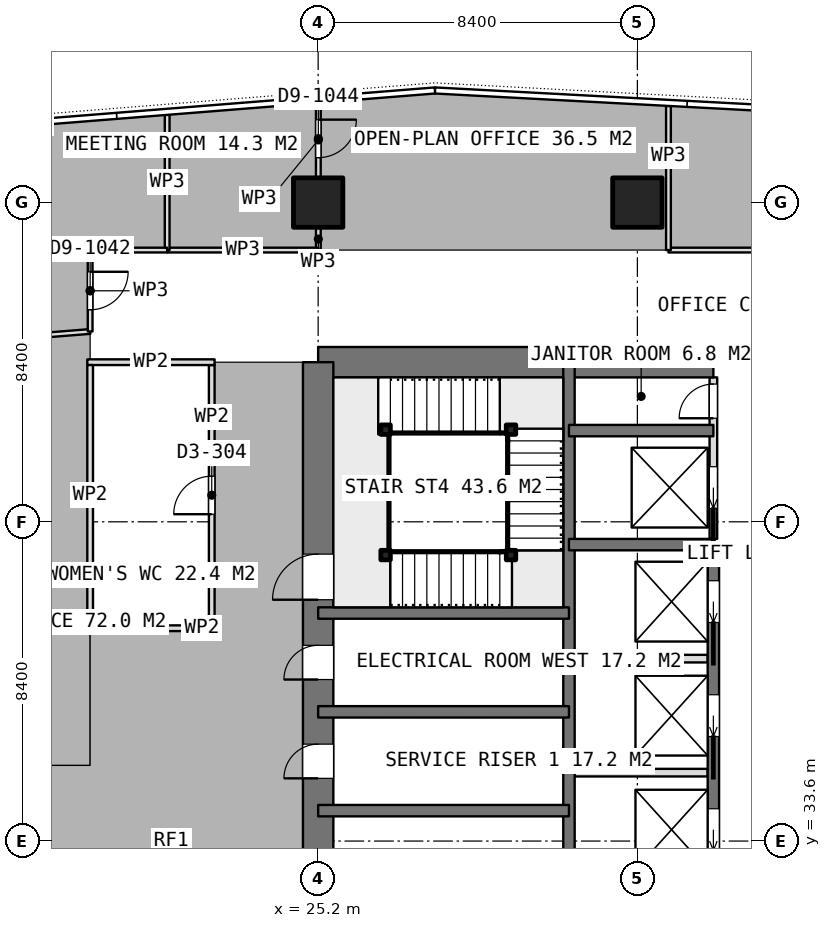
"""IFC4 building model, lengths in metres.
Left out: names, types, materials, properties, quantities, classifications, styles, units other than length and angle.
Written with IfcOpenShell. Run it as: python <this file> out.ifc"""

import sys

from ifc_helpers import new_model, si_unit, direction, frame, frame_2d, origin, origin_2d, place, context, subcontext, project, spatial, rectangle, extrude, element, fill, save


model = new_model("IFC4")
c1 = context("Model", 3, precision=1e-05, world=origin(), true_north=direction((0.0, 1.0)))
c2 = subcontext(c1, "Body", "Model", "MODEL_VIEW")
j1 = project(units=[si_unit("LENGTHUNIT", "METRE"), si_unit("PLANEANGLEUNIT", "RADIAN")], contexts=[c1])
p1 = place(None, origin())
s1 = spatial("IfcSite", under=j1, at=p1, CompositionType="ELEMENT")
p2 = place(p1, origin())
s2 = spatial("IfcBuilding", under=s1, at=p2, CompositionType="ELEMENT")
p3 = place(p2, frame((0.0, 0.0, 280.1)))
s3 = spatial("IfcBuildingStorey", under=s2, at=p3, CompositionType="ELEMENT", Elevation=280.1)
p4 = place(p3, frame((25.2, 46.2, 0.0), z_axis=(0.0, 0.0, 1.0), x_axis=(1.0, 0.0, 0.0)))
e1 = element("IfcWall", 1, at=p4, inside=s3, PredefinedType="SHEAR", context=c2, shape_type="SweptSolid", body=[
    extrude(rectangle(XDim=10.4, YDim=0.8, at=frame_2d((5.2, 0.0))), origin(), (0.0, 0.0, 1.0), 3.75),
])
p5 = place(p3, frame((25.2, 21.0, 0.0), z_axis=(0.0, 0.0, 1.0), x_axis=(0.0, 1.0, 0.0)))
e2 = element("IfcWall", 2, at=p5, inside=s3, PredefinedType="SHEAR", context=c2, shape_type="SweptSolid", body=[
    extrude(rectangle(XDim=25.2, YDim=0.8, at=frame_2d((12.6, 0.0))), origin(), (0.0, 0.0, 1.0), 3.75),
])
p6 = place(p5, frame((7.8, 0.0, 0.0)))
e3 = element("IfcOpeningElement", 3, at=p6, cuts=e2, PredefinedType="OPENING", context=c2, shape_type="SweptSolid", body=[
    extrude(rectangle(XDim=1.2, YDim=2.1, at=frame_2d((0.6, 1.05))), frame((0.0, 0.41, 0.0), z_axis=(0.0, -1.0, 0.0), x_axis=(1.0, 0.0, 0.0)), (0.0, 0.0, 1.0), 0.82),
])
p7 = place(p5, frame((14.25, 0.0, 0.0)))
e4 = element("IfcOpeningElement", 4, at=p7, cuts=e2, PredefinedType="OPENING", context=c2, shape_type="SweptSolid", body=[
    extrude(rectangle(XDim=0.9, YDim=2.1, at=frame_2d((0.45, 1.05))), frame((0.0, 0.41, 0.0), z_axis=(0.0, -1.0, 0.0), x_axis=(1.0, 0.0, 0.0)), (0.0, 0.0, 1.0), 0.82),
])
p8 = place(p5, frame((16.85, 0.0, 0.0)))
e5 = element("IfcOpeningElement", 5, at=p8, cuts=e2, PredefinedType="OPENING", context=c2, shape_type="SweptSolid", body=[
    extrude(rectangle(XDim=0.9, YDim=2.1, at=frame_2d((0.45, 1.05))), frame((0.0, 0.41, 0.0), z_axis=(0.0, -1.0, 0.0), x_axis=(1.0, 0.0, 0.0)), (0.0, 0.0, 1.0), 0.82),
])
p9 = place(p5, frame((18.95, 0.0, 0.0)))
e6 = element("IfcOpeningElement", 6, at=p9, cuts=e2, PredefinedType="OPENING", context=c2, shape_type="SweptSolid", body=[
    extrude(rectangle(XDim=1.2, YDim=2.1, at=frame_2d((0.6, 1.05))), frame((0.0, 0.41, 0.0), z_axis=(0.0, -1.0, 0.0), x_axis=(1.0, 0.0, 0.0)), (0.0, 0.0, 1.0), 0.82),
])
p10 = place(p3, frame((31.8, 21.0, 0.0), z_axis=(0.0, 0.0, 1.0), x_axis=(0.0, 1.0, 0.0)))
e7 = element("IfcWall", 7, at=p10, inside=s3, PredefinedType="SHEAR", context=c2, shape_type="SweptSolid", body=[
    extrude(rectangle(XDim=25.2, YDim=0.3, at=frame_2d((12.6, 0.0))), origin(), (0.0, 0.0, 1.0), 3.75),
])
p11 = place(p3, frame((35.6, 23.4, 0.0), z_axis=(0.0, 0.0, 1.0), x_axis=(0.0, 1.0, 0.0)))
e8 = element("IfcWall", 8, at=p11, inside=s3, PredefinedType="SHEAR", context=c2, shape_type="SweptSolid", body=[
    extrude(rectangle(XDim=18.0, YDim=0.3, at=frame_2d((9.0, 0.0))), origin(), (0.0, 0.0, 1.0), 3.75),
])
p12 = place(p11, frame((0.95, 0.0, 0.0)))
e9 = element("IfcOpeningElement", 9, at=p12, cuts=e8, PredefinedType="OPENING", context=c2, shape_type="SweptSolid", body=[
    extrude(rectangle(XDim=1.1, YDim=2.1, at=frame_2d((0.55, 1.05))), frame((0.0, 0.16, 0.0), z_axis=(0.0, -1.0, 0.0), x_axis=(1.0, 0.0, 0.0)), (0.0, 0.0, 1.0), 0.32),
])
p13 = place(p11, frame((3.95, 0.0, 0.0)))
e10 = element("IfcOpeningElement", 10, at=p13, cuts=e8, PredefinedType="OPENING", context=c2, shape_type="SweptSolid", body=[
    extrude(rectangle(XDim=1.1, YDim=2.1, at=frame_2d((0.55, 1.05))), frame((0.0, 0.16, 0.0), z_axis=(0.0, -1.0, 0.0), x_axis=(1.0, 0.0, 0.0)), (0.0, 0.0, 1.0), 0.32),
])
p14 = place(p11, frame((6.95, 0.0, 0.0)))
e11 = element("IfcOpeningElement", 11, at=p14, cuts=e8, PredefinedType="OPENING", context=c2, shape_type="SweptSolid", body=[
    extrude(rectangle(XDim=1.1, YDim=2.1, at=frame_2d((0.55, 1.05))), frame((0.0, 0.16, 0.0), z_axis=(0.0, -1.0, 0.0), x_axis=(1.0, 0.0, 0.0)), (0.0, 0.0, 1.0), 0.32),
])
p15 = place(p11, frame((9.95, 0.0, 0.0)))
e12 = element("IfcOpeningElement", 12, at=p15, cuts=e8, PredefinedType="OPENING", context=c2, shape_type="SweptSolid", body=[
    extrude(rectangle(XDim=1.1, YDim=2.1, at=frame_2d((0.55, 1.05))), frame((0.0, 0.16, 0.0), z_axis=(0.0, -1.0, 0.0), x_axis=(1.0, 0.0, 0.0)), (0.0, 0.0, 1.0), 0.32),
])
p16 = place(p11, frame((12.95, 0.0, 0.0)))
e13 = element("IfcOpeningElement", 13, at=p16, cuts=e8, PredefinedType="OPENING", context=c2, shape_type="SweptSolid", body=[
    extrude(rectangle(XDim=1.1, YDim=2.1, at=frame_2d((0.55, 1.05))), frame((0.0, 0.16, 0.0), z_axis=(0.0, -1.0, 0.0), x_axis=(1.0, 0.0, 0.0)), (0.0, 0.0, 1.0), 0.32),
])
p17 = place(p11, frame((15.95, 0.0, 0.0)))
e14 = element("IfcOpeningElement", 14, at=p17, cuts=e8, PredefinedType="OPENING", context=c2, shape_type="SweptSolid", body=[
    extrude(rectangle(XDim=1.1, YDim=2.1, at=frame_2d((0.55, 1.05))), frame((0.0, 0.16, 0.0), z_axis=(0.0, -1.0, 0.0), x_axis=(1.0, 0.0, 0.0)), (0.0, 0.0, 1.0), 0.32),
])
for number, where, z_axis, x_axis in (
    (15, (31.8, 41.4, 0.0), (0.0, 0.0, 1.0), (1.0, 0.0, 0.0)),
    (16, (31.8, 44.4, 0.0), (0.0, 0.0, 1.0), (1.0, 0.0, 0.0)),
):
    element("IfcWall", number, at=place(p3, frame(where, z_axis=z_axis, x_axis=x_axis)), inside=s3, PredefinedType="SHEAR", context=c2, shape_type="SweptSolid", body=[
        extrude(rectangle(XDim=3.8, YDim=0.3, at=frame_2d((1.9, 0.0))), origin(), (0.0, 0.0, 1.0), 3.75),
    ])
for number, where, z_axis, x_axis in (
    (17, (25.2, 34.4, 0.0), (0.0, 0.0, 1.0), (1.0, 0.0, 0.0)),
    (18, (25.2, 37.0, 0.0), (0.0, 0.0, 1.0), (1.0, 0.0, 0.0)),
    (19, (25.2, 39.6, 0.0), (0.0, 0.0, 1.0), (1.0, 0.0, 0.0)),
):
    element("IfcWall", number, at=place(p3, frame(where, z_axis=z_axis, x_axis=x_axis)), inside=s3, PredefinedType="SHEAR", context=c2, shape_type="SweptSolid", body=[
        extrude(rectangle(XDim=6.6, YDim=0.3, at=frame_2d((3.3, 0.0))), origin(), (0.0, 0.0, 1.0), 3.75),
    ])
for number, where, z_axis, x_axis in (
    (20, (25.2, 50.4, 0.0), (0.0, 0.0, 1.0), (1.0, 0.0, 0.0)),
    (21, (33.6, 50.4, 0.0), (0.0, 0.0, 1.0), (1.0, 0.0, 0.0)),
):
    element("IfcColumn", number, at=place(p3, frame(where, z_axis=z_axis, x_axis=x_axis)), inside=s3, PredefinedType="COLUMN", context=c2, shape_type="SweptSolid", body=[
        extrude(rectangle(XDim=1.3, YDim=1.3, at=origin_2d()), origin(), (0.0, 0.0, 1.0), 3.75),
    ])
for number, where, z_axis, x_axis in (
    (22, (31.95, 35.4, 0.0), (0.0, 0.0, 1.0), (1.0, 0.0, 0.0)),
    (23, (31.95, 38.4, 0.0), (0.0, 0.0, 1.0), (1.0, 0.0, 0.0)),
):
    element("IfcWall", number, at=place(p3, frame(where, z_axis=z_axis, x_axis=x_axis)), inside=s3, PredefinedType="PARTITIONING", context=c2, shape_type="SweptSolid", body=[
        extrude(rectangle(XDim=3.5, YDim=0.2, at=frame_2d((1.75, 0.0))), origin(), (0.0, 0.0, 1.0), 3.5),
    ])
p18 = place(p3, frame((35.6, 41.55, 0.0), z_axis=(0.0, 0.0, 1.0), x_axis=(0.0, 1.0, 0.0)))
e24 = element("IfcWall", 24, at=p18, inside=s3, PredefinedType="PARTITIONING", context=c2, shape_type="SweptSolid", body=[
    extrude(rectangle(XDim=4.25, YDim=0.2, at=frame_2d((2.125, 0.0))), origin(), (0.0, 0.0, 1.0), 3.5),
])
p19 = place(p18, frame((3.175, 0.0, 0.0)))
e25 = element("IfcOpeningElement", 25, at=p19, cuts=e24, PredefinedType="OPENING", context=c2, shape_type="SweptSolid", body=[
    extrude(rectangle(XDim=0.9, YDim=2.1, at=frame_2d((0.45, 1.05))), frame((0.0, 0.11, 0.0), z_axis=(0.0, -1.0, 0.0), x_axis=(1.0, 0.0, 0.0)), (0.0, 0.0, 1.0), 0.22),
])
p20 = place(p18, frame((0.8, 0.0, 0.0)))
e26 = element("IfcOpeningElement", 26, at=p20, cuts=e24, PredefinedType="OPENING", context=c2, shape_type="SweptSolid", body=[
    extrude(rectangle(XDim=1.1, YDim=2.1, at=frame_2d((0.55, 1.05))), frame((0.0, 0.11, 0.0), z_axis=(0.0, -1.0, 0.0), x_axis=(1.0, 0.0, 0.0)), (0.0, 0.0, 1.0), 0.22),
])
for number, where, z_axis, x_axis in (
    (27, (19.125, 39.2, 0.0), (0.0, 0.0, 1.0), (1.0, 0.0, 0.0)),
    (28, (19.125, 46.2, 0.0), (0.0, 0.0, 1.0), (1.0, 0.0, 0.0)),
):
    element("IfcWall", number, at=place(p3, frame(where, z_axis=z_axis, x_axis=x_axis)), inside=s3, PredefinedType="PARTITIONING", context=c2, shape_type="SweptSolid", body=[
        extrude(rectangle(XDim=3.35, YDim=0.15, at=frame_2d((1.675, 0.0))), origin(), (0.0, 0.0, 1.0), 3.5),
    ])
p21 = place(p3, frame((19.2, 39.275, 0.0), z_axis=(0.0, 0.0, 1.0), x_axis=(0.0, 1.0, 0.0)))
e29 = element("IfcWall", 29, at=p21, inside=s3, PredefinedType="PARTITIONING", context=c2, shape_type="SweptSolid", body=[
    extrude(rectangle(XDim=6.85, YDim=0.15, at=frame_2d((3.425, 0.0))), origin(), (0.0, 0.0, 1.0), 3.5),
])
p22 = place(p3, frame((22.4, 39.275, 0.0), z_axis=(0.0, 0.0, 1.0), x_axis=(0.0, 1.0, 0.0)))
e30 = element("IfcWall", 30, at=p22, inside=s3, PredefinedType="PARTITIONING", context=c2, shape_type="SweptSolid", body=[
    extrude(rectangle(XDim=6.85, YDim=0.15, at=frame_2d((3.425, 0.0))), origin(), (0.0, 0.0, 1.0), 3.5),
])
p23 = place(p22, frame((2.925, 0.0, 0.0)))
e31 = element("IfcOpeningElement", 31, at=p23, cuts=e30, PredefinedType="OPENING", context=c2, shape_type="SweptSolid", body=[
    extrude(rectangle(XDim=1.0, YDim=2.1, at=frame_2d((0.5, 1.05))), frame((0.0, 0.085, 0.0), z_axis=(0.0, -1.0, 0.0), x_axis=(1.0, 0.0, 0.0)), (0.0, 0.0, 1.0), 0.17),
])
p24 = place(p3, frame((52.123, 49.15, 0.0), z_axis=(0.0, 0.0, 1.0), x_axis=(-1.0, 0.0, 0.0)))
e32 = element("IfcWall", 32, at=p24, inside=s3, PredefinedType="PARTITIONING", context=c2, shape_type="SweptSolid", body=[
    extrude(rectangle(XDim=17.705, YDim=0.125, at=frame_2d((8.853, 0.0))), origin(), (0.0, 0.0, 1.0), 3.5),
])
p25 = place(p24, frame((7.553, 0.0, 0.0)))
e33 = element("IfcOpeningElement", 33, at=p25, cuts=e32, PredefinedType="OPENING", context=c2, shape_type="SweptSolid", body=[
    extrude(rectangle(XDim=1.8, YDim=2.1, at=frame_2d((0.9, 1.05))), frame((0.0, 0.073, 0.0), z_axis=(0.0, -1.0, 0.0), x_axis=(1.0, 0.0, 0.0)), (0.0, 0.0, 1.0), 0.145),
])
p26 = place(p3, frame((34.418, 49.15, 0.0), z_axis=(0.0, 0.0, 1.0), x_axis=(0.0, 1.0, 0.0)))
e34 = element("IfcWall", 34, at=p26, inside=s3, PredefinedType="PARTITIONING", context=c2, shape_type="SweptSolid", body=[
    extrude(rectangle(XDim=3.793, YDim=0.125, at=frame_2d((1.896, 0.0))), origin(), (0.0, 0.0, 1.0), 3.5),
])
p27 = place(p3, frame((25.205, 53.025, 0.0), z_axis=(0.0, 0.0, 1.0), x_axis=(0.0, -1.0, 0.0)))
e35 = element("IfcWall", 35, at=p27, inside=s3, PredefinedType="PARTITIONING", context=c2, shape_type="SweptSolid", body=[
    extrude(rectangle(XDim=1.955, YDim=0.125, at=frame_2d((0.978, 0.0))), origin(), (0.0, 0.0, 1.0), 3.5),
])
p28 = place(p27, frame((0.443, 0.0, 0.0)))
e36 = element("IfcOpeningElement", 36, at=p28, cuts=e35, PredefinedType="OPENING", context=c2, shape_type="SweptSolid", body=[
    extrude(rectangle(XDim=1.0, YDim=2.1, at=frame_2d((0.5, 1.05))), frame((0.0, 0.073, 0.0), z_axis=(0.0, -1.0, 0.0), x_axis=(1.0, 0.0, 0.0)), (0.0, 0.0, 1.0), 0.145),
])
p29 = place(p3, frame((25.205, 49.73, 0.0), z_axis=(0.0, 0.0, 1.0), x_axis=(0.0, -1.0, 0.0)))
e37 = element("IfcWall", 37, at=p29, inside=s3, PredefinedType="PARTITIONING", context=c2, shape_type="SweptSolid", body=[
    extrude(rectangle(XDim=0.58, YDim=0.125, at=frame_2d((0.29, 0.0))), origin(), (0.0, 0.0, 1.0), 3.5),
])
p30 = place(p3, frame((25.205, 49.15, 0.0), z_axis=(0.0, 0.0, 1.0), x_axis=(-1.0, 0.0, 0.0)))
e38 = element("IfcWall", 38, at=p30, inside=s3, PredefinedType="PARTITIONING", context=c2, shape_type="SweptSolid", body=[
    extrude(rectangle(XDim=3.978, YDim=0.125, at=frame_2d((1.989, 0.0))), origin(), (0.0, 0.0, 1.0), 3.5),
])
p31 = place(p3, frame((21.227, 49.15, 0.0), z_axis=(0.0, 0.0, 1.0), x_axis=(0.0, 1.0, 0.0)))
e39 = element("IfcWall", 39, at=p31, inside=s3, PredefinedType="PARTITIONING", context=c2, shape_type="SweptSolid", body=[
    extrude(rectangle(XDim=3.558, YDim=0.125, at=frame_2d((1.779, 0.0))), origin(), (0.0, 0.0, 1.0), 3.5),
])
p32 = place(p3, frame((19.2, 47.008, 0.0), z_axis=(0.0, 0.0, 1.0), x_axis=(-0.996842300725, -0.079406721921, 0.0)))
e40 = element("IfcWall", 40, at=p32, inside=s3, PredefinedType="PARTITIONING", context=c2, shape_type="SweptSolid", body=[
    extrude(rectangle(XDim=6.02, YDim=0.125, at=frame_2d((3.01, 0.0))), origin(), (0.0, 0.0, 1.0), 3.5),
])
p33 = place(p3, frame((21.226, 49.15, 0.0), z_axis=(0.0, 0.0, 1.0), x_axis=(-1.0, 0.0, 0.0)))
e41 = element("IfcWall", 41, at=p33, inside=s3, PredefinedType="PARTITIONING", context=c2, shape_type="SweptSolid", body=[
    extrude(rectangle(XDim=2.026, YDim=0.125, at=frame_2d((1.013, 0.0))), origin(), (0.0, 0.0, 1.0), 3.5),
])
p34 = place(p3, frame((19.2, 49.15, 0.0), z_axis=(0.0, 0.0, 1.0), x_axis=(0.0, -1.0, 0.0)))
e42 = element("IfcWall", 42, at=p34, inside=s3, PredefinedType="PARTITIONING", context=c2, shape_type="SweptSolid", body=[
    extrude(rectangle(XDim=2.142, YDim=0.125, at=frame_2d((1.071, 0.0))), origin(), (0.0, 0.0, 1.0), 3.5),
])
p35 = place(p34, frame((0.571, 0.0, 0.0)))
e43 = element("IfcOpeningElement", 43, at=p35, cuts=e42, PredefinedType="OPENING", context=c2, shape_type="SweptSolid", body=[
    extrude(rectangle(XDim=1.0, YDim=2.1, at=frame_2d((0.5, 1.05))), frame((0.0, 0.073, 0.0), z_axis=(0.0, -1.0, 0.0), x_axis=(1.0, 0.0, 0.0)), (0.0, 0.0, 1.0), 0.145),
])
for number, where, z_axis, x_axis in (
    (44, (26.975, 41.125, 0.0), (0.0, 0.0, 1.0), (1.0, 0.0, 0.0)),
    (45, (30.275, 41.125, 0.0), (0.0, 0.0, 1.0), (1.0, 0.0, 0.0)),
    (46, (30.275, 44.425, 0.0), (0.0, 0.0, 1.0), (1.0, 0.0, 0.0)),
    (47, (26.975, 44.425, 0.0), (0.0, 0.0, 1.0), (1.0, 0.0, 0.0)),
):
    element("IfcColumn", number, at=place(p3, frame(where, z_axis=z_axis, x_axis=x_axis)), inside=s3, PredefinedType="COLUMN", context=c2, shape_type="SweptSolid", body=[
        extrude(rectangle(XDim=0.25, YDim=0.25, at=origin_2d()), origin(), (0.0, 0.0, 1.0), 3.75),
    ])
p36 = place(p7, origin())
e48 = element("IfcDoor", 48, at=p36, inside=s3, OperationType="SINGLE_SWING_LEFT", PredefinedType="DOOR", context=c2, shape_type="SweptSolid", body=[
    extrude(rectangle(XDim=0.9, YDim=2.1, at=frame_2d((0.45, 1.05))), frame((0.0, 0.025, 0.0), z_axis=(0.0, -1.0, 0.0), x_axis=(1.0, 0.0, 0.0)), (0.0, 0.0, 1.0), 0.05),
])
fill(e4, e48)
p37 = place(p8, origin())
e49 = element("IfcDoor", 49, at=p37, inside=s3, OperationType="SINGLE_SWING_LEFT", PredefinedType="DOOR", context=c2, shape_type="SweptSolid", body=[
    extrude(rectangle(XDim=0.9, YDim=2.1, at=frame_2d((0.45, 1.05))), frame((0.0, 0.025, 0.0), z_axis=(0.0, -1.0, 0.0), x_axis=(1.0, 0.0, 0.0)), (0.0, 0.0, 1.0), 0.05),
])
fill(e5, e49)
p38 = place(p19, origin())
e50 = element("IfcDoor", 50, at=p38, inside=s3, OperationType="SINGLE_SWING_LEFT", PredefinedType="DOOR", context=c2, shape_type="SweptSolid", body=[
    extrude(rectangle(XDim=0.9, YDim=2.1, at=frame_2d((0.45, 1.05))), frame((0.0, 0.025, 0.0), z_axis=(0.0, -1.0, 0.0), x_axis=(1.0, 0.0, 0.0)), (0.0, 0.0, 1.0), 0.05),
])
fill(e25, e50)
p39 = place(p15, origin())
e51 = element("IfcDoor", 51, at=p39, inside=s3, OperationType="SLIDING_TO_LEFT", PredefinedType="USERDEFINED", context=c2, shape_type="SweptSolid", body=[
    extrude(rectangle(XDim=1.1, YDim=2.1, at=frame_2d((0.55, 1.05))), frame((0.0, 0.025, 0.0), z_axis=(0.0, -1.0, 0.0), x_axis=(1.0, 0.0, 0.0)), (0.0, 0.0, 1.0), 0.05),
])
fill(e12, e51)
p40 = place(p16, origin())
e52 = element("IfcDoor", 52, at=p40, inside=s3, OperationType="SLIDING_TO_LEFT", PredefinedType="USERDEFINED", context=c2, shape_type="SweptSolid", body=[
    extrude(rectangle(XDim=1.1, YDim=2.1, at=frame_2d((0.55, 1.05))), frame((0.0, 0.025, 0.0), z_axis=(0.0, -1.0, 0.0), x_axis=(1.0, 0.0, 0.0)), (0.0, 0.0, 1.0), 0.05),
])
fill(e13, e52)
p41 = place(p17, origin())
e53 = element("IfcDoor", 53, at=p41, inside=s3, OperationType="SLIDING_TO_LEFT", PredefinedType="USERDEFINED", context=c2, shape_type="SweptSolid", body=[
    extrude(rectangle(XDim=1.1, YDim=2.1, at=frame_2d((0.55, 1.05))), frame((0.0, 0.025, 0.0), z_axis=(0.0, -1.0, 0.0), x_axis=(1.0, 0.0, 0.0)), (0.0, 0.0, 1.0), 0.05),
])
fill(e14, e53)
p42 = place(p20, origin())
e54 = element("IfcDoor", 54, at=p42, inside=s3, OperationType="SLIDING_TO_LEFT", PredefinedType="USERDEFINED", context=c2, shape_type="SweptSolid", body=[
    extrude(rectangle(XDim=1.1, YDim=2.1, at=frame_2d((0.55, 1.05))), frame((0.0, 0.025, 0.0), z_axis=(0.0, -1.0, 0.0), x_axis=(1.0, 0.0, 0.0)), (0.0, 0.0, 1.0), 0.05),
])
fill(e26, e54)
p43 = place(p23, origin())
e55 = element("IfcDoor", 55, at=p43, inside=s3, OperationType="SINGLE_SWING_LEFT", PredefinedType="DOOR", context=c2, shape_type="SweptSolid", body=[
    extrude(rectangle(XDim=1.0, YDim=2.1, at=frame_2d((0.5, 1.05))), frame((0.0, 0.025, 0.0), z_axis=(0.0, -1.0, 0.0), x_axis=(1.0, 0.0, 0.0)), (0.0, 0.0, 1.0), 0.05),
])
fill(e31, e55)
p44 = place(p28, origin())
e56 = element("IfcDoor", 56, at=p44, inside=s3, OperationType="SINGLE_SWING_LEFT", PredefinedType="DOOR", context=c2, shape_type="SweptSolid", body=[
    extrude(rectangle(XDim=1.0, YDim=2.1, at=frame_2d((0.5, 1.05))), frame((0.0, 0.025, 0.0), z_axis=(0.0, -1.0, 0.0), x_axis=(1.0, 0.0, 0.0)), (0.0, 0.0, 1.0), 0.05),
])
fill(e36, e56)
p45 = place(p35, origin())
e57 = element("IfcDoor", 57, at=p45, inside=s3, OperationType="SINGLE_SWING_LEFT", PredefinedType="DOOR", context=c2, shape_type="SweptSolid", body=[
    extrude(rectangle(XDim=1.0, YDim=2.1, at=frame_2d((0.5, 1.05))), frame((0.0, 0.025, 0.0), z_axis=(0.0, -1.0, 0.0), x_axis=(1.0, 0.0, 0.0)), (0.0, 0.0, 1.0), 0.05),
])
fill(e43, e57)
p46 = place(p9, origin())
e58 = element("IfcDoor", 58, at=p46, inside=s3, OperationType="SINGLE_SWING_RIGHT", PredefinedType="DOOR", context=c2, shape_type="SweptSolid", body=[
    extrude(rectangle(XDim=1.2, YDim=2.1, at=frame_2d((0.6, 1.05))), frame((0.0, 0.025, 0.0), z_axis=(0.0, -1.0, 0.0), x_axis=(1.0, 0.0, 0.0)), (0.0, 0.0, 1.0), 0.05),
])
fill(e6, e58)
save(model, sys.argv[1])
